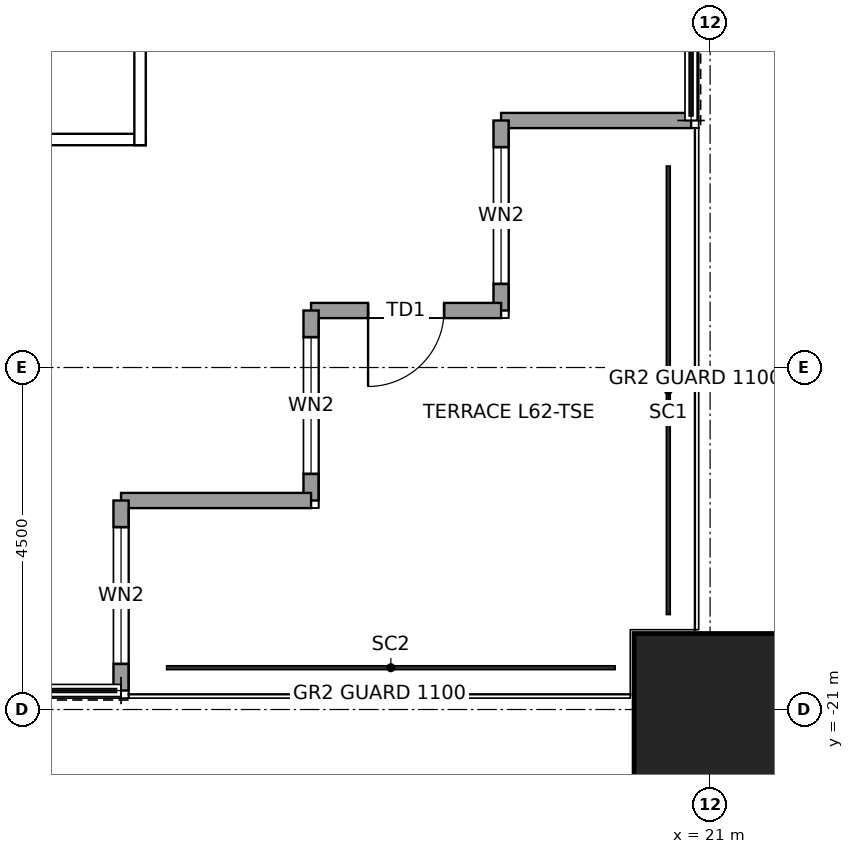
"""IFC4 building model, lengths in metres.
Left out: names, types, materials, properties, quantities, classifications, styles, units other than length and angle.
Written with IfcOpenShell. Run it as: python <this file> out.ifc"""

import sys

from ifc_helpers import new_model, si_unit, direction, frame, frame_2d, origin, origin_2d, place, context, subcontext, project, spatial, rectangle, hollow_rectangle, extrude, element, fill, save


model = new_model("IFC4")
c1 = context("Model", 3, precision=1e-05, world=origin(), true_north=direction((0.0, 1.0)))
c2 = subcontext(c1, "Body", "Model", "MODEL_VIEW")
j1 = project(units=[si_unit("LENGTHUNIT", "METRE"), si_unit("PLANEANGLEUNIT", "RADIAN")], contexts=[c1])
p1 = place(None, origin())
s1 = spatial("IfcSite", under=j1, at=p1, CompositionType="ELEMENT")
p2 = place(p1, origin())
s2 = spatial("IfcBuilding", under=s1, at=p2, CompositionType="ELEMENT")
p3 = place(p2, frame((0.0, 0.0, 283.9)))
s3 = spatial("IfcBuildingStorey", under=s2, at=p3, CompositionType="ELEMENT", Elevation=283.9)
p4 = place(p3, frame((21.0, -21.0, 0.0), z_axis=(0.0, 0.0, 1.0), x_axis=(1.0, 0.0, 0.0)))
e1 = element("IfcColumn", 1, at=p4, inside=s3, PredefinedType="COLUMN", context=c2, shape_type="SweptSolid", body=[
    extrude(hollow_rectangle(XDim=2.0, YDim=2.0, WallThickness=0.095, at=origin_2d()), origin(), (0.0, 0.0, 1.0), 4.0),
])
p5 = place(p3, frame((20.75, -13.25, 0.0), z_axis=(0.0, 0.0, 1.0), x_axis=(-1.0, 0.0, 0.0)))
e2 = element("IfcWall", 2, at=p5, inside=s3, PredefinedType="SOLIDWALL", context=c2, shape_type="SweptSolid", body=[
    extrude(rectangle(XDim=2.5, YDim=0.2, at=frame_2d((1.25, 0.0))), origin(), (0.0, 0.0, 1.0), 3.85),
])
p6 = place(p3, frame((18.25, -13.25, 0.0), z_axis=(0.0, 0.0, 1.0), x_axis=(0.0, -1.0, 0.0)))
e3 = element("IfcWall", 3, at=p6, inside=s3, PredefinedType="SOLIDWALL", context=c2, shape_type="SweptSolid", body=[
    extrude(rectangle(XDim=2.5, YDim=0.2, at=frame_2d((1.25, 0.0))), origin(), (0.0, 0.0, 1.0), 3.85),
])
p7 = place(p6, frame((0.35, 0.0, 0.3)))
e4 = element("IfcOpeningElement", 4, at=p7, cuts=e3, PredefinedType="OPENING", context=c2, shape_type="SweptSolid", body=[
    extrude(rectangle(XDim=1.8, YDim=2.4, at=frame_2d((0.9, 1.2))), frame((0.0, 0.11, 0.0), z_axis=(0.0, -1.0, 0.0), x_axis=(1.0, 0.0, 0.0)), (0.0, 0.0, 1.0), 0.22),
])
p8 = place(p3, frame((18.25, -15.75, 0.0), z_axis=(0.0, 0.0, 1.0), x_axis=(-1.0, 0.0, 0.0)))
e5 = element("IfcWall", 5, at=p8, inside=s3, PredefinedType="SOLIDWALL", context=c2, shape_type="SweptSolid", body=[
    extrude(rectangle(XDim=2.5, YDim=0.2, at=frame_2d((1.25, 0.0))), origin(), (0.0, 0.0, 1.0), 3.317),
])
p9 = place(p8, frame((0.75, 0.0, 0.0)))
e6 = element("IfcOpeningElement", 6, at=p9, cuts=e5, PredefinedType="OPENING", context=c2, shape_type="SweptSolid", body=[
    extrude(rectangle(XDim=1.0, YDim=2.4, at=frame_2d((0.5, 1.2))), frame((0.0, 0.11, 0.0), z_axis=(0.0, -1.0, 0.0), x_axis=(1.0, 0.0, 0.0)), (0.0, 0.0, 1.0), 0.22),
])
p10 = place(p3, frame((15.75, -15.75, 0.0), z_axis=(0.0, 0.0, 1.0), x_axis=(0.0, -1.0, 0.0)))
e7 = element("IfcWall", 7, at=p10, inside=s3, PredefinedType="SOLIDWALL", context=c2, shape_type="SweptSolid", body=[
    extrude(rectangle(XDim=2.5, YDim=0.2, at=frame_2d((1.25, 0.0))), origin(), (0.0, 0.0, 1.0), 3.85),
])
p11 = place(p10, frame((0.35, 0.0, 0.3)))
e8 = element("IfcOpeningElement", 8, at=p11, cuts=e7, PredefinedType="OPENING", context=c2, shape_type="SweptSolid", body=[
    extrude(rectangle(XDim=1.8, YDim=2.4, at=frame_2d((0.9, 1.2))), frame((0.0, 0.11, 0.0), z_axis=(0.0, -1.0, 0.0), x_axis=(1.0, 0.0, 0.0)), (0.0, 0.0, 1.0), 0.22),
])
p12 = place(p3, frame((15.75, -18.25, 0.0), z_axis=(0.0, 0.0, 1.0), x_axis=(-1.0, 0.0, 0.0)))
e9 = element("IfcWall", 9, at=p12, inside=s3, PredefinedType="SOLIDWALL", context=c2, shape_type="SweptSolid", body=[
    extrude(rectangle(XDim=2.5, YDim=0.2, at=frame_2d((1.25, 0.0))), origin(), (0.0, 0.0, 1.0), 3.85),
])
p13 = place(p3, frame((13.25, -18.25, 0.0), z_axis=(0.0, 0.0, 1.0), x_axis=(0.0, -1.0, 0.0)))
e10 = element("IfcWall", 10, at=p13, inside=s3, PredefinedType="SOLIDWALL", context=c2, shape_type="SweptSolid", body=[
    extrude(rectangle(XDim=2.5, YDim=0.2, at=frame_2d((1.25, 0.0))), origin(), (0.0, 0.0, 1.0), 3.85),
])
p14 = place(p13, frame((0.35, 0.0, 0.3)))
e11 = element("IfcOpeningElement", 11, at=p14, cuts=e10, PredefinedType="OPENING", context=c2, shape_type="SweptSolid", body=[
    extrude(rectangle(XDim=1.8, YDim=2.4, at=frame_2d((0.9, 1.2))), frame((0.0, 0.11, 0.0), z_axis=(0.0, -1.0, 0.0), x_axis=(1.0, 0.0, 0.0)), (0.0, 0.0, 1.0), 0.22),
])
p15 = place(p3, frame((2.425, -13.5, 0.0), z_axis=(0.0, 0.0, 1.0), x_axis=(1.0, 0.0, 0.0)))
e12 = element("IfcWall", 12, at=p15, inside=s3, PredefinedType="PARTITIONING", context=c2, shape_type="SweptSolid", body=[
    extrude(rectangle(XDim=11.15, YDim=0.15, at=frame_2d((5.575, 0.0))), origin(), (0.0, 0.0, 1.0), 3.85),
])
p16 = place(p3, frame((13.5, -13.575, 0.0), z_axis=(0.0, 0.0, 1.0), x_axis=(0.0, 1.0, 0.0)))
e13 = element("IfcWall", 13, at=p16, inside=s3, PredefinedType="PARTITIONING", context=c2, shape_type="SweptSolid", body=[
    extrude(rectangle(XDim=27.15, YDim=0.15, at=frame_2d((13.575, 0.0))), origin(), (0.0, 0.0, 1.0), 3.85),
])
p17 = place(p7, origin())
e14 = element("IfcWindow", 14, at=p17, inside=s3, PartitioningType="SINGLE_PANEL", PredefinedType="WINDOW", context=c2, shape_type="SweptSolid", body=[
    extrude(rectangle(XDim=1.8, YDim=2.4, at=frame_2d((0.9, 1.2))), frame((0.0, 0.03, 0.0), z_axis=(0.0, -1.0, 0.0), x_axis=(1.0, 0.0, 0.0)), (0.0, 0.0, 1.0), 0.06),
])
fill(e4, e14)
p18 = place(p9, origin())
e15 = element("IfcDoor", 15, at=p18, inside=s3, OperationType="SINGLE_SWING_RIGHT", PredefinedType="DOOR", context=c2, shape_type="SweptSolid", body=[
    extrude(rectangle(XDim=1.0, YDim=2.4, at=frame_2d((0.5, 1.2))), frame((0.0, 0.025, 0.0), z_axis=(0.0, -1.0, 0.0), x_axis=(1.0, 0.0, 0.0)), (0.0, 0.0, 1.0), 0.05),
])
fill(e6, e15)
p19 = place(p11, origin())
e16 = element("IfcWindow", 16, at=p19, inside=s3, PartitioningType="SINGLE_PANEL", PredefinedType="WINDOW", context=c2, shape_type="SweptSolid", body=[
    extrude(rectangle(XDim=1.8, YDim=2.4, at=frame_2d((0.9, 1.2))), frame((0.0, 0.03, 0.0), z_axis=(0.0, -1.0, 0.0), x_axis=(1.0, 0.0, 0.0)), (0.0, 0.0, 1.0), 0.06),
])
fill(e8, e16)
p20 = place(p14, origin())
e17 = element("IfcWindow", 17, at=p20, inside=s3, PartitioningType="SINGLE_PANEL", PredefinedType="WINDOW", context=c2, shape_type="SweptSolid", body=[
    extrude(rectangle(XDim=1.8, YDim=2.4, at=frame_2d((0.9, 1.2))), frame((0.0, 0.03, 0.0), z_axis=(0.0, -1.0, 0.0), x_axis=(1.0, 0.0, 0.0)), (0.0, 0.0, 1.0), 0.06),
])
fill(e11, e17)
save(model, sys.argv[1])
